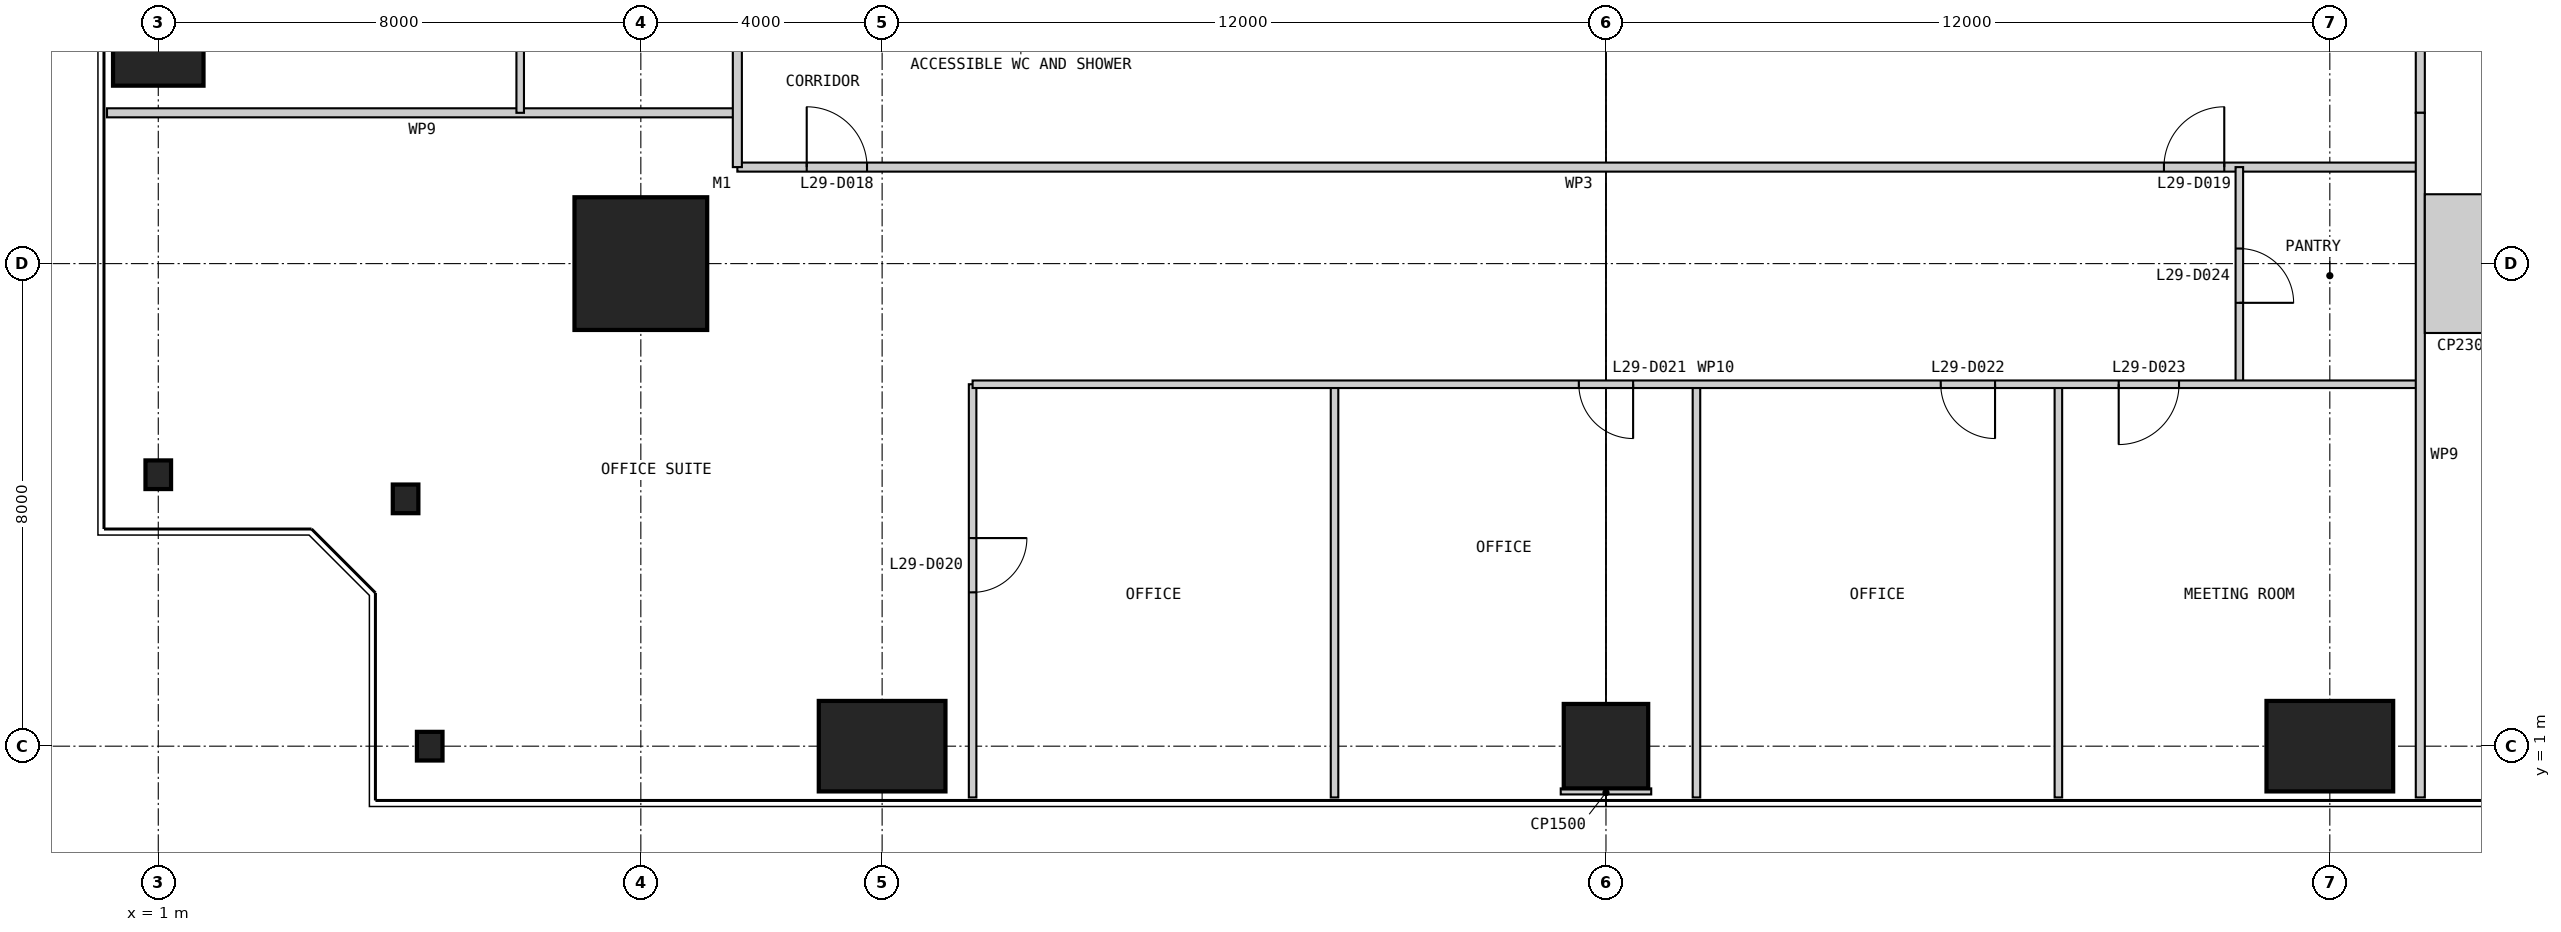
"""IFC4 building model, lengths in metres.
Left out: names, types, materials, properties, quantities, classifications, styles, units other than length and angle.
Written with IfcOpenShell. Run it as: python <this file> out.ifc"""

import sys

from ifc_helpers import new_model, si_unit, direction, frame, frame_2d, origin, origin_2d, place, context, subcontext, project, spatial, rectangle, i_section, extrude, element, fill, save


model = new_model("IFC4")
c1 = context("Model", 3, precision=1e-05, world=origin(), true_north=direction((0.0, 1.0)))
c2 = subcontext(c1, "Body", "Model", "MODEL_VIEW")
j1 = project(units=[si_unit("LENGTHUNIT", "METRE"), si_unit("PLANEANGLEUNIT", "RADIAN")], contexts=[c1])
p1 = place(None, origin())
s1 = spatial("IfcSite", under=j1, at=p1, CompositionType="ELEMENT")
p2 = place(p1, origin())
s2 = spatial("IfcBuilding", under=s1, at=p2, CompositionType="ELEMENT")
p3 = place(p2, frame((0.0, 0.0, 126.4)))
s3 = spatial("IfcBuildingStorey", under=s2, at=p3, CompositionType="ELEMENT", Elevation=126.4)
p4 = place(p3, frame((9.0, 9.0, 0.0), z_axis=(0.0, 0.0, 1.0), x_axis=(1.0, 0.0, 0.0)))
e1 = element("IfcColumn", 1, at=p4, inside=s3, PredefinedType="COLUMN", context=c2, shape_type="SweptSolid", body=[
    extrude(rectangle(XDim=2.2, YDim=2.2, at=origin_2d()), origin(), (0.0, 0.0, 1.0), 4.0),
])
p5 = place(p3, frame((5.5, 1.0, 0.0), z_axis=(0.0, 0.0, 1.0), x_axis=(1.0, 0.0, 0.0)))
e2 = element("IfcColumn", 2, at=p5, inside=s3, PredefinedType="COLUMN", context=c2, shape_type="SweptSolid", body=[
    extrude(i_section(OverallWidth=0.424, OverallDepth=0.475, WebThickness=0.048, FlangeThickness=0.077, at=origin_2d()), origin(), (0.0, 0.0, 1.0), 4.0),
])
p6 = place(p3, frame((13.0, 1.0, 0.0), z_axis=(0.0, 0.0, 1.0), x_axis=(1.0, 0.0, 0.0)))
e3 = element("IfcColumn", 3, at=p6, inside=s3, PredefinedType="COLUMN", context=c2, shape_type="SweptSolid", body=[
    extrude(rectangle(XDim=2.1, YDim=1.5, at=origin_2d()), origin(), (0.0, 0.0, 1.0), 4.0),
])
p7 = place(p3, frame((25.0, 1.0, 0.0), z_axis=(0.0, 0.0, 1.0), x_axis=(1.0, 0.0, 0.0)))
e4 = element("IfcColumn", 4, at=p7, inside=s3, PredefinedType="COLUMN", context=c2, shape_type="SweptSolid", body=[
    extrude(rectangle(XDim=1.4, YDim=1.4, at=origin_2d()), origin(), (0.0, 0.0, 1.0), 4.0),
])
p8 = place(p3, frame((37.0, 1.0, 0.0), z_axis=(0.0, 0.0, 1.0), x_axis=(1.0, 0.0, 0.0)))
e5 = element("IfcColumn", 5, at=p8, inside=s3, PredefinedType="COLUMN", context=c2, shape_type="SweptSolid", body=[
    extrude(rectangle(XDim=2.1, YDim=1.5, at=origin_2d()), origin(), (0.0, 0.0, 1.0), 4.0),
])
p9 = place(p3, frame((1.0, 13.0, 0.0), z_axis=(0.0, 0.0, 1.0), x_axis=(1.0, 0.0, 0.0)))
e6 = element("IfcColumn", 6, at=p9, inside=s3, PredefinedType="COLUMN", context=c2, shape_type="SweptSolid", body=[
    extrude(rectangle(XDim=1.5, YDim=2.1, at=origin_2d()), origin(), (0.0, 0.0, 1.0), 4.0),
])
for number, where, z_axis, x_axis in (
    (7, (1.0, 5.5, 0.0), (0.0, 0.0, 1.0), (1.0, 0.0, 0.0)),
    (8, (5.1, 5.1, 0.0), (0.0, 0.0, 1.0), (1.0, 0.0, 0.0)),
):
    element("IfcColumn", number, at=place(p3, frame(where, z_axis=z_axis, x_axis=x_axis)), inside=s3, PredefinedType="COLUMN", context=c2, shape_type="SweptSolid", body=[
        extrude(i_section(OverallWidth=0.424, OverallDepth=0.475, WebThickness=0.048, FlangeThickness=0.077, at=origin_2d()), origin(), (0.0, 0.0, 1.0), 4.0),
    ])
p10 = place(p3, frame((10.6, 10.6, 0.0), z_axis=(0.0, 0.0, 1.0), x_axis=(1.0, 0.0, 0.0)))
e9 = element("IfcWall", 9, at=p10, inside=s3, PredefinedType="PARTITIONING", context=c2, shape_type="SweptSolid", body=[
    extrude(rectangle(XDim=27.9, YDim=0.15, at=frame_2d((13.95, 0.0))), origin(), (0.0, 0.0, 1.0), 3.85),
])
p11 = place(p10, frame((1.15, 0.0, 0.0)))
e10 = element("IfcOpeningElement", 10, at=p11, cuts=e9, PredefinedType="OPENING", context=c2, shape_type="SweptSolid", body=[
    extrude(rectangle(XDim=1.0, YDim=2.2, at=frame_2d((0.5, 1.1))), frame((0.0, 0.085, 0.0), z_axis=(0.0, -1.0, 0.0), x_axis=(1.0, 0.0, 0.0)), (0.0, 0.0, 1.0), 0.17),
])
p12 = place(p10, frame((23.65, 0.0, 0.0)))
e11 = element("IfcOpeningElement", 11, at=p12, cuts=e9, PredefinedType="OPENING", context=c2, shape_type="SweptSolid", body=[
    extrude(rectangle(XDim=1.0, YDim=2.2, at=frame_2d((0.5, 1.1))), frame((0.0, 0.085, 0.0), z_axis=(0.0, -1.0, 0.0), x_axis=(1.0, 0.0, 0.0)), (0.0, 0.0, 1.0), 0.17),
])
p13 = place(p3, frame((0.15, 11.5, 0.0), z_axis=(0.0, 0.0, 1.0), x_axis=(1.0, 0.0, 0.0)))
e12 = element("IfcWall", 12, at=p13, inside=s3, PredefinedType="PARTITIONING", context=c2, shape_type="SweptSolid", body=[
    extrude(rectangle(XDim=10.45, YDim=0.15, at=frame_2d((5.225, 0.0))), origin(), (0.0, 0.0, 1.0), 3.85),
])
p14 = place(p3, frame((14.5, 0.15, 0.0), z_axis=(0.0, 0.0, 1.0), x_axis=(0.0, 1.0, 0.0)))
e13 = element("IfcWall", 13, at=p14, inside=s3, PredefinedType="PARTITIONING", context=c2, shape_type="SweptSolid", body=[
    extrude(rectangle(XDim=6.85, YDim=0.125, at=frame_2d((3.425, 0.0))), origin(), (0.0, 0.0, 1.0), 3.85),
])
p15 = place(p14, frame((3.4, 0.0, 0.0)))
e14 = element("IfcOpeningElement", 14, at=p15, cuts=e13, PredefinedType="OPENING", context=c2, shape_type="SweptSolid", body=[
    extrude(rectangle(XDim=0.9, YDim=2.2, at=frame_2d((0.45, 1.1))), frame((0.0, 0.073, 0.0), z_axis=(0.0, -1.0, 0.0), x_axis=(1.0, 0.0, 0.0)), (0.0, 0.0, 1.0), 0.145),
])
for number, where, z_axis, x_axis in (
    (15, (20.5, 0.15, 0.0), (0.0, 0.0, 1.0), (0.0, 1.0, 0.0)),
    (16, (26.5, 0.15, 0.0), (0.0, 0.0, 1.0), (0.0, 1.0, 0.0)),
    (17, (32.5, 0.15, 0.0), (0.0, 0.0, 1.0), (0.0, 1.0, 0.0)),
):
    element("IfcWall", number, at=place(p3, frame(where, z_axis=z_axis, x_axis=x_axis)), inside=s3, PredefinedType="PARTITIONING", context=c2, shape_type="SweptSolid", body=[
        extrude(rectangle(XDim=6.85, YDim=0.125, at=frame_2d((3.425, 0.0))), origin(), (0.0, 0.0, 1.0), 3.85),
    ])
p16 = place(p3, frame((35.5, 7.0, 0.0), z_axis=(0.0, 0.0, 1.0), x_axis=(0.0, 1.0, 0.0)))
e18 = element("IfcWall", 18, at=p16, inside=s3, PredefinedType="PARTITIONING", context=c2, shape_type="SweptSolid", body=[
    extrude(rectangle(XDim=3.6, YDim=0.125, at=frame_2d((1.8, 0.0))), origin(), (0.0, 0.0, 1.0), 3.85),
])
p17 = place(p16, frame((1.35, 0.0, 0.0)))
e19 = element("IfcOpeningElement", 19, at=p17, cuts=e18, PredefinedType="OPENING", context=c2, shape_type="SweptSolid", body=[
    extrude(rectangle(XDim=0.9, YDim=2.2, at=frame_2d((0.45, 1.1))), frame((0.0, 0.073, 0.0), z_axis=(0.0, -1.0, 0.0), x_axis=(1.0, 0.0, 0.0)), (0.0, 0.0, 1.0), 0.145),
])
p18 = place(p3, frame((14.5, 7.0, 0.0), z_axis=(0.0, 0.0, 1.0), x_axis=(1.0, 0.0, 0.0)))
e20 = element("IfcWall", 20, at=p18, inside=s3, PredefinedType="PARTITIONING", context=c2, shape_type="SweptSolid", body=[
    extrude(rectangle(XDim=24.0, YDim=0.125, at=frame_2d((12.0, 0.0))), origin(), (0.0, 0.0, 1.0), 3.85),
])
p19 = place(p18, frame((10.05, 0.0, 0.0)))
e21 = element("IfcOpeningElement", 21, at=p19, cuts=e20, PredefinedType="OPENING", context=c2, shape_type="SweptSolid", body=[
    extrude(rectangle(XDim=0.9, YDim=2.2, at=frame_2d((0.45, 1.1))), frame((0.0, 0.073, 0.0), z_axis=(0.0, -1.0, 0.0), x_axis=(1.0, 0.0, 0.0)), (0.0, 0.0, 1.0), 0.145),
])
p20 = place(p18, frame((16.05, 0.0, 0.0)))
e22 = element("IfcOpeningElement", 22, at=p20, cuts=e20, PredefinedType="OPENING", context=c2, shape_type="SweptSolid", body=[
    extrude(rectangle(XDim=0.9, YDim=2.2, at=frame_2d((0.45, 1.1))), frame((0.0, 0.073, 0.0), z_axis=(0.0, -1.0, 0.0), x_axis=(1.0, 0.0, 0.0)), (0.0, 0.0, 1.0), 0.145),
])
p21 = place(p18, frame((19.0, 0.0, 0.0)))
e23 = element("IfcOpeningElement", 23, at=p21, cuts=e20, PredefinedType="OPENING", context=c2, shape_type="SweptSolid", body=[
    extrude(rectangle(XDim=1.0, YDim=2.2, at=frame_2d((0.5, 1.1))), frame((0.0, 0.073, 0.0), z_axis=(0.0, -1.0, 0.0), x_axis=(1.0, 0.0, 0.0)), (0.0, 0.0, 1.0), 0.145),
])
p22 = place(p3, frame((38.5, 11.5, 0.0), z_axis=(0.0, 0.0, 1.0), x_axis=(0.0, 1.0, 0.0)))
e24 = element("IfcWall", 24, at=p22, inside=s3, PredefinedType="PARTITIONING", context=c2, shape_type="SweptSolid", body=[
    extrude(rectangle(XDim=27.0, YDim=0.15, at=frame_2d((13.5, 0.0))), origin(), (0.0, 0.0, 1.0), 3.85),
])
p23 = place(p22, frame((13.0, 0.0, 0.0)))
e25 = element("IfcOpeningElement", 25, at=p23, cuts=e24, PredefinedType="OPENING", context=c2, shape_type="SweptSolid", body=[
    extrude(rectangle(XDim=1.0, YDim=2.2, at=frame_2d((0.5, 1.1))), frame((0.0, 0.085, 0.0), z_axis=(0.0, -1.0, 0.0), x_axis=(1.0, 0.0, 0.0)), (0.0, 0.0, 1.0), 0.17),
])
p24 = place(p3, frame((38.5, 0.15, 0.0), z_axis=(0.0, 0.0, 1.0), x_axis=(0.0, 1.0, 0.0)))
e26 = element("IfcWall", 26, at=p24, inside=s3, PredefinedType="PARTITIONING", context=c2, shape_type="SweptSolid", body=[
    extrude(rectangle(XDim=11.35, YDim=0.15, at=frame_2d((5.675, 0.0))), origin(), (0.0, 0.0, 1.0), 3.85),
])
p25 = place(p3, frame((10.6, 38.5, 0.0), z_axis=(0.0, 0.0, 1.0), x_axis=(0.0, -1.0, 0.0)))
e27 = element("IfcWall", 27, at=p25, inside=s3, PredefinedType="PARTITIONING", context=c2, shape_type="SweptSolid", body=[
    extrude(rectangle(XDim=27.9, YDim=0.15, at=frame_2d((13.95, 0.0))), origin(), (0.0, 0.0, 1.0), 3.85),
])
p26 = place(p25, frame((1.75, 0.0, 0.0)))
e28 = element("IfcOpeningElement", 28, at=p26, cuts=e27, PredefinedType="OPENING", context=c2, shape_type="SweptSolid", body=[
    extrude(rectangle(XDim=1.0, YDim=2.2, at=frame_2d((0.5, 1.1))), frame((0.0, 0.085, 0.0), z_axis=(0.0, -1.0, 0.0), x_axis=(1.0, 0.0, 0.0)), (0.0, 0.0, 1.0), 0.17),
])
p27 = place(p25, frame((22.75, 0.0, 0.0)))
e29 = element("IfcOpeningElement", 29, at=p27, cuts=e27, PredefinedType="OPENING", context=c2, shape_type="SweptSolid", body=[
    extrude(rectangle(XDim=1.0, YDim=2.2, at=frame_2d((0.5, 1.1))), frame((0.0, 0.085, 0.0), z_axis=(0.0, -1.0, 0.0), x_axis=(1.0, 0.0, 0.0)), (0.0, 0.0, 1.0), 0.17),
])
p28 = place(p3, frame((7.0, 17.5, 0.0), z_axis=(0.0, 0.0, 1.0), x_axis=(0.0, -1.0, 0.0)))
e30 = element("IfcWall", 30, at=p28, inside=s3, PredefinedType="PARTITIONING", context=c2, shape_type="SweptSolid", body=[
    extrude(rectangle(XDim=6.0, YDim=0.125, at=frame_2d((3.0, 0.0))), origin(), (0.0, 0.0, 1.0), 3.238),
])
p29 = place(p3, frame((25.0, 0.2, 0.0), z_axis=(0.0, 0.0, 1.0), x_axis=(0.0, 1.0, 0.0)))
e31 = element("IfcWall", 31, at=p29, inside=s3, PredefinedType="PARTITIONING", context=c2, shape_type="SweptSolid", body=[
    extrude(rectangle(XDim=0.1, YDim=1.5, at=frame_2d((0.05, 0.0))), origin(), (0.0, 0.0, 1.0), 3.85),
])
p30 = place(p3, frame((38.575, 9.0, 0.0), z_axis=(0.0, 0.0, 1.0), x_axis=(1.0, 0.0, 0.0)))
e32 = element("IfcWall", 32, at=p30, inside=s3, PredefinedType="PARTITIONING", context=c2, shape_type="SweptSolid", body=[
    extrude(rectangle(XDim=1.325, YDim=2.3, at=frame_2d((0.663, 0.0))), origin(), (0.0, 0.0, 1.0), 3.85),
])
p31 = place(p11, origin())
e33 = element("IfcDoor", 33, at=p31, inside=s3, OperationType="SINGLE_SWING_LEFT", PredefinedType="DOOR", context=c2, shape_type="SweptSolid", body=[
    extrude(rectangle(XDim=1.0, YDim=2.2, at=frame_2d((0.5, 1.1))), frame((0.0, 0.025, 0.0), z_axis=(0.0, -1.0, 0.0), x_axis=(1.0, 0.0, 0.0)), (0.0, 0.0, 1.0), 0.05),
])
fill(e10, e33)
p32 = place(p12, origin())
e34 = element("IfcDoor", 34, at=p32, inside=s3, OperationType="SINGLE_SWING_RIGHT", PredefinedType="DOOR", context=c2, shape_type="SweptSolid", body=[
    extrude(rectangle(XDim=1.0, YDim=2.2, at=frame_2d((0.5, 1.1))), frame((0.0, 0.025, 0.0), z_axis=(0.0, -1.0, 0.0), x_axis=(1.0, 0.0, 0.0)), (0.0, 0.0, 1.0), 0.05),
])
fill(e11, e34)
p33 = place(p15, frame((0.9, 0.0, 0.0), z_axis=(0.0, 0.0, 1.0), x_axis=(-1.0, 0.0, 0.0)))
e35 = element("IfcDoor", 35, at=p33, inside=s3, OperationType="SINGLE_SWING_LEFT", PredefinedType="DOOR", context=c2, shape_type="SweptSolid", body=[
    extrude(rectangle(XDim=0.9, YDim=2.2, at=frame_2d((0.45, 1.1))), frame((0.0, 0.025, 0.0), z_axis=(0.0, -1.0, 0.0), x_axis=(1.0, 0.0, 0.0)), (0.0, 0.0, 1.0), 0.05),
])
fill(e14, e35)
p34 = place(p19, frame((0.9, 0.0, 0.0), z_axis=(0.0, 0.0, 1.0), x_axis=(-1.0, 0.0, 0.0)))
e36 = element("IfcDoor", 36, at=p34, inside=s3, OperationType="SINGLE_SWING_LEFT", PredefinedType="DOOR", context=c2, shape_type="SweptSolid", body=[
    extrude(rectangle(XDim=0.9, YDim=2.2, at=frame_2d((0.45, 1.1))), frame((0.0, 0.025, 0.0), z_axis=(0.0, -1.0, 0.0), x_axis=(1.0, 0.0, 0.0)), (0.0, 0.0, 1.0), 0.05),
])
fill(e21, e36)
p35 = place(p20, frame((0.9, 0.0, 0.0), z_axis=(0.0, 0.0, 1.0), x_axis=(-1.0, 0.0, 0.0)))
e37 = element("IfcDoor", 37, at=p35, inside=s3, OperationType="SINGLE_SWING_LEFT", PredefinedType="DOOR", context=c2, shape_type="SweptSolid", body=[
    extrude(rectangle(XDim=0.9, YDim=2.2, at=frame_2d((0.45, 1.1))), frame((0.0, 0.025, 0.0), z_axis=(0.0, -1.0, 0.0), x_axis=(1.0, 0.0, 0.0)), (0.0, 0.0, 1.0), 0.05),
])
fill(e22, e37)
p36 = place(p21, frame((1.0, 0.0, 0.0), z_axis=(0.0, 0.0, 1.0), x_axis=(-1.0, 0.0, 0.0)))
e38 = element("IfcDoor", 38, at=p36, inside=s3, OperationType="SINGLE_SWING_RIGHT", PredefinedType="DOOR", context=c2, shape_type="SweptSolid", body=[
    extrude(rectangle(XDim=1.0, YDim=2.2, at=frame_2d((0.5, 1.1))), frame((0.0, 0.025, 0.0), z_axis=(0.0, -1.0, 0.0), x_axis=(1.0, 0.0, 0.0)), (0.0, 0.0, 1.0), 0.05),
])
fill(e23, e38)
p37 = place(p17, frame((0.9, 0.0, 0.0), z_axis=(0.0, 0.0, 1.0), x_axis=(-1.0, 0.0, 0.0)))
e39 = element("IfcDoor", 39, at=p37, inside=s3, OperationType="SINGLE_SWING_RIGHT", PredefinedType="DOOR", context=c2, shape_type="SweptSolid", body=[
    extrude(rectangle(XDim=0.9, YDim=2.2, at=frame_2d((0.45, 1.1))), frame((0.0, 0.025, 0.0), z_axis=(0.0, -1.0, 0.0), x_axis=(1.0, 0.0, 0.0)), (0.0, 0.0, 1.0), 0.05),
])
fill(e19, e39)
save(model, sys.argv[1])
